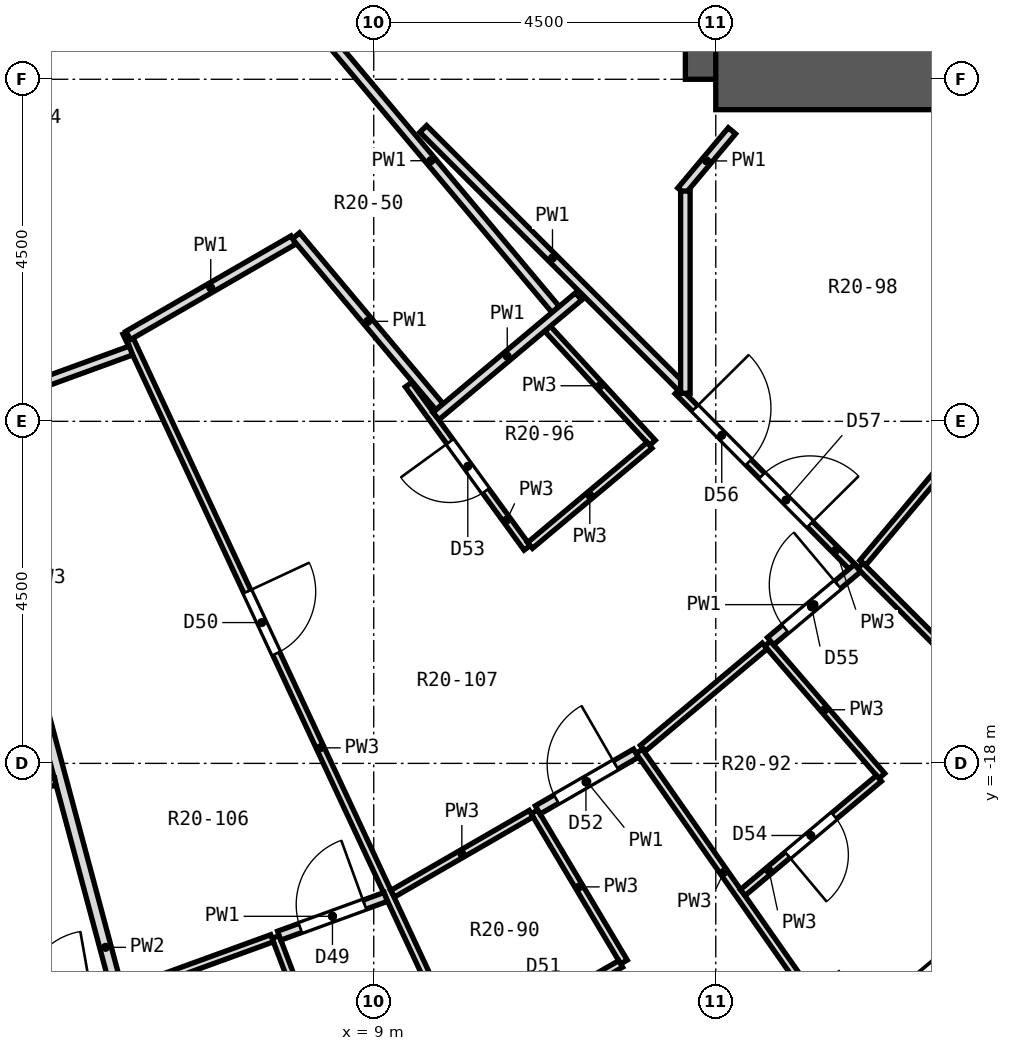
"""IFC4 building model, lengths in metres.
Left out: names, types, materials, properties, quantities, classifications, styles, units other than length and angle.
Written with IfcOpenShell. Run it as: python <this file> out.ifc"""

import sys

from ifc_helpers import new_model, si_unit, direction, frame, frame_2d, origin, place, context, subcontext, project, spatial, rectangle, extrude, element, fill, save


model = new_model("IFC4")
c1 = context("Model", 3, precision=1e-05, world=origin(), true_north=direction((0.0, 1.0)))
c2 = subcontext(c1, "Body", "Model", "MODEL_VIEW")
j1 = project(units=[si_unit("LENGTHUNIT", "METRE"), si_unit("PLANEANGLEUNIT", "RADIAN")], contexts=[c1])
p1 = place(None, origin())
s1 = spatial("IfcSite", under=j1, at=p1, CompositionType="ELEMENT")
p2 = place(p1, origin())
s2 = spatial("IfcBuilding", under=s1, at=p2, CompositionType="ELEMENT")
p3 = place(p2, frame((0.0, 0.0, 121.6)))
s3 = spatial("IfcBuildingStorey", under=s2, at=p3, CompositionType="ELEMENT", Elevation=121.6)
p4 = place(p3, frame((13.5, -9.0, 0.0), z_axis=(0.0, 0.0, 1.0), x_axis=(0.0, 1.0, 0.0)))
e1 = element("IfcWall", 1, at=p4, inside=s3, PredefinedType="SHEAR", context=c2, shape_type="SweptSolid", body=[
    extrude(rectangle(XDim=18.0, YDim=0.8, at=frame_2d((9.0, 0.0))), origin(), (0.0, 0.0, 1.0), 3.3),
])
p5 = place(p4, frame((15.4, 0.0, 0.0)))
e2 = element("IfcOpeningElement", 2, at=p5, cuts=e1, PredefinedType="OPENING", context=c2, shape_type="SweptSolid", body=[
    extrude(rectangle(XDim=1.2, YDim=2.1, at=frame_2d((0.6, 1.05))), frame((0.0, 0.412, 0.0), z_axis=(0.0, -1.0, 0.0), x_axis=(1.0, 0.0, 0.0)), (0.0, 0.0, 1.0), 0.824),
])
p6 = place(p4, frame((1.4, 0.0, 0.0)))
e3 = element("IfcOpeningElement", 3, at=p6, cuts=e1, PredefinedType="OPENING", context=c2, shape_type="SweptSolid", body=[
    extrude(rectangle(XDim=1.2, YDim=2.1, at=frame_2d((0.6, 1.05))), frame((0.0, 0.412, 0.0), z_axis=(0.0, -1.0, 0.0), x_axis=(1.0, 0.0, 0.0)), (0.0, 0.0, 1.0), 0.824),
])
p7 = place(p4, frame((7.5, 0.0, 0.0)))
e4 = element("IfcOpeningElement", 4, at=p7, cuts=e1, PredefinedType="OPENING", context=c2, shape_type="SweptSolid", body=[
    extrude(rectangle(XDim=3.0, YDim=2.4, at=frame_2d((1.5, 1.2))), frame((0.0, 0.412, 0.0), z_axis=(0.0, -1.0, 0.0), x_axis=(1.0, 0.0, 0.0)), (0.0, 0.0, 1.0), 0.824),
])
p8 = place(p3, frame((13.5, -9.0, 0.0), z_axis=(0.0, 0.0, 1.0), x_axis=(1.0, 0.0, 0.0)))
e5 = element("IfcWall", 5, at=p8, inside=s3, PredefinedType="SHEAR", context=c2, shape_type="SweptSolid", body=[
    extrude(rectangle(XDim=10.4, YDim=0.8, at=frame_2d((5.2, 0.0))), origin(), (0.0, 0.0, 1.0), 3.3),
])
p9 = place(p3, frame((15.699, -21.547, 0.0), z_axis=(0.0, 0.0, 1.0), x_axis=(0.766055462616, 0.642774476932, 0.0)))
e6 = element("IfcWall", 6, at=p9, inside=s3, PredefinedType="SOLIDWALL", context=c2, shape_type="SweptSolid", body=[
    extrude(rectangle(XDim=3.648, YDim=0.6, at=frame_2d((1.824, 0.0))), origin(), (0.0, 0.0, 1.0), 2.8),
])
p10 = place(p9, frame((0.674, 0.0, 0.9)))
e7 = element("IfcOpeningElement", 7, at=p10, cuts=e6, PredefinedType="OPENING", context=c2, shape_type="SweptSolid", body=[
    extrude(rectangle(XDim=2.3, YDim=1.8, at=frame_2d((1.15, 0.9))), frame((0.0, 0.312, 0.0), z_axis=(0.0, -1.0, 0.0), x_axis=(1.0, 0.0, 0.0)), (0.0, 0.0, 1.0), 0.624),
])
p11 = place(p3, frame((4.3, -16.05, 0.0), z_axis=(0.0, 0.0, 1.0), x_axis=(0.25880441681, -0.965929745809, 0.0)))
e8 = element("IfcWall", 8, at=p11, inside=s3, PredefinedType="PARTITIONING", context=c2, shape_type="SweptSolid", body=[
    extrude(rectangle(XDim=9.049, YDim=0.15, at=frame_2d((4.524, 0.0))), origin(), (0.0, 0.0, 1.0), 2.8),
])
p12 = place(p3, frame((7.709, -20.284, 0.0), z_axis=(0.0, 0.0, 1.0), x_axis=(0.355156544563, -0.934806840397, 0.0)))
e9 = element("IfcWall", 9, at=p12, inside=s3, PredefinedType="PARTITIONING", context=c2, shape_type="SweptSolid", body=[
    extrude(rectangle(XDim=2.3, YDim=0.1, at=frame_2d((1.15, 0.0))), origin(), (0.0, 0.0, 1.0), 2.8),
])
p13 = place(p3, frame((5.746, -12.331, 0.0), z_axis=(0.0, 0.0, 1.0), x_axis=(0.422888789848, -0.906181588547, 0.0)))
e10 = element("IfcWall", 10, at=p13, inside=s3, PredefinedType="PARTITIONING", context=c2, shape_type="SweptSolid", body=[
    extrude(rectangle(XDim=12.061, YDim=0.1, at=frame_2d((6.03, 0.0))), origin(), (0.0, 0.0, 1.0), 2.8),
])
p14 = place(p13, frame((3.761, 0.0, 0.0)))
e11 = element("IfcOpeningElement", 11, at=p14, cuts=e10, PredefinedType="OPENING", context=c2, shape_type="SweptSolid", body=[
    extrude(rectangle(XDim=0.9, YDim=2.1, at=frame_2d((0.45, 1.05))), frame((0.0, 0.062, 0.0), z_axis=(0.0, -1.0, 0.0), x_axis=(1.0, 0.0, 0.0)), (0.0, 0.0, 1.0), 0.124),
])
p15 = place(p3, frame((11.114, -18.637, 0.0), z_axis=(0.0, 0.0, 1.0), x_axis=(0.512043462342, -0.858959540766, 0.0)))
e12 = element("IfcWall", 12, at=p15, inside=s3, PredefinedType="PARTITIONING", context=c2, shape_type="SweptSolid", body=[
    extrude(rectangle(XDim=2.301, YDim=0.1, at=frame_2d((1.15, 0.0))), origin(), (0.0, 0.0, 1.0), 2.8),
])
p16 = place(p3, frame((12.493, -17.841, 0.0), z_axis=(0.0, 0.0, 1.0), x_axis=(0.573453908861, -0.819237825306, 0.0)))
e13 = element("IfcWall", 13, at=p16, inside=s3, PredefinedType="PARTITIONING", context=c2, shape_type="SweptSolid", body=[
    extrude(rectangle(XDim=3.885, YDim=0.1, at=frame_2d((1.942, 0.0))), origin(), (0.0, 0.0, 1.0), 2.8),
])
p17 = place(p3, frame((9.457, -13.018, 0.0), z_axis=(0.0, 0.0, 1.0), x_axis=(0.588073257703, -0.808807667851, 0.0)))
e14 = element("IfcWall", 14, at=p17, inside=s3, PredefinedType="PARTITIONING", context=c2, shape_type="SweptSolid", body=[
    extrude(rectangle(XDim=2.655, YDim=0.1, at=frame_2d((1.327, 0.0))), origin(), (0.0, 0.0, 1.0), 2.8),
])
p18 = place(p17, frame((0.927, 0.0, 0.0)))
e15 = element("IfcOpeningElement", 15, at=p18, cuts=e14, PredefinedType="OPENING", context=c2, shape_type="SweptSolid", body=[
    extrude(rectangle(XDim=0.8, YDim=2.1, at=frame_2d((0.4, 1.05))), frame((0.0, 0.062, 0.0), z_axis=(0.0, -1.0, 0.0), x_axis=(1.0, 0.0, 0.0)), (0.0, 0.0, 1.0), 0.124),
])
p19 = place(p3, frame((7.977, -11.059, 0.0), z_axis=(0.0, 0.0, 1.0), x_axis=(0.642755449711, -0.766071427393, 0.0)))
e16 = element("IfcWall", 16, at=p19, inside=s3, PredefinedType="PARTITIONING", context=c2, shape_type="SweptSolid", body=[
    extrude(rectangle(XDim=2.938, YDim=0.125, at=frame_2d((1.469, 0.0))), origin(), (0.0, 0.0, 1.0), 2.8),
])
p20 = place(p3, frame((8.109, -8.115, 0.0), z_axis=(0.0, 0.0, 1.0), x_axis=(0.642822182591, -0.766015431678, 0.0)))
e17 = element("IfcWall", 17, at=p20, inside=s3, PredefinedType="PARTITIONING", context=c2, shape_type="SweptSolid", body=[
    extrude(rectangle(XDim=5.109, YDim=0.125, at=frame_2d((2.554, 0.0))), origin(), (0.0, 0.0, 1.0), 2.8),
])
p21 = place(p3, frame((14.182, -16.424, 0.0), z_axis=(0.0, 0.0, 1.0), x_axis=(0.653523142882, -0.756906534334, 0.0)))
e18 = element("IfcWall", 18, at=p21, inside=s3, PredefinedType="PARTITIONING", context=c2, shape_type="SweptSolid", body=[
    extrude(rectangle(XDim=2.3, YDim=0.1, at=frame_2d((1.15, 0.0))), origin(), (0.0, 0.0, 1.0), 2.8),
])
p22 = place(p3, frame((11.286, -12.281, 0.0), z_axis=(0.0, 0.0, 1.0), x_axis=(0.676742772151, -0.736219546291, 0.0)))
e19 = element("IfcWall", 19, at=p22, inside=s3, PredefinedType="PARTITIONING", context=c2, shape_type="SweptSolid", body=[
    extrude(rectangle(XDim=2.04, YDim=0.1, at=frame_2d((1.02, 0.0))), origin(), (0.0, 0.0, 1.0), 2.8),
])
p23 = place(p3, frame((13.0, -13.102, 0.0), z_axis=(0.0, 0.0, 1.0), x_axis=(0.704550545607, -0.70965380904, 0.0)))
e20 = element("IfcWall", 20, at=p23, inside=s3, PredefinedType="PARTITIONING", context=c2, shape_type="SweptSolid", body=[
    extrude(rectangle(XDim=3.253, YDim=0.1, at=frame_2d((1.626, 0.0))), origin(), (0.0, 0.0, 1.0), 2.8),
])
p24 = place(p23, frame((0.32, 0.0, 0.0)))
e21 = element("IfcOpeningElement", 21, at=p24, cuts=e20, PredefinedType="OPENING", context=c2, shape_type="SweptSolid", body=[
    extrude(rectangle(XDim=1.0, YDim=2.1, at=frame_2d((0.5, 1.05))), frame((0.0, 0.062, 0.0), z_axis=(0.0, -1.0, 0.0), x_axis=(1.0, 0.0, 0.0)), (0.0, 0.0, 1.0), 0.124),
])
p25 = place(p23, frame((1.57, 0.0, 0.0)))
e22 = element("IfcOpeningElement", 22, at=p25, cuts=e20, PredefinedType="OPENING", context=c2, shape_type="SweptSolid", body=[
    extrude(rectangle(XDim=0.9, YDim=2.1, at=frame_2d((0.45, 1.05))), frame((0.0, 0.062, 0.0), z_axis=(0.0, -1.0, 0.0), x_axis=(1.0, 0.0, 0.0)), (0.0, 0.0, 1.0), 0.124),
])
p26 = place(p3, frame((9.651, -9.653, 0.0), z_axis=(0.0, 0.0, 1.0), x_axis=(0.707386044222, -0.706827407816, 0.0)))
e23 = element("IfcWall", 23, at=p26, inside=s3, PredefinedType="PARTITIONING", context=c2, shape_type="SweptSolid", body=[
    extrude(rectangle(XDim=4.807, YDim=0.125, at=frame_2d((2.404, 0.0))), origin(), (0.0, 0.0, 1.0), 2.8),
])
p27 = place(p3, frame((15.401, -15.401, 0.0), z_axis=(0.0, 0.0, 1.0), x_axis=(0.707106781187, -0.707106781187, 0.0)))
e24 = element("IfcWall", 24, at=p27, inside=s3, PredefinedType="PARTITIONING", context=c2, shape_type="SweptSolid", body=[
    extrude(rectangle(XDim=3.885, YDim=0.1, at=frame_2d((1.942, 0.0))), origin(), (0.0, 0.0, 1.0), 2.8),
])
p28 = place(p3, frame((1.694, -18.79, 0.0), z_axis=(0.0, 0.0, 1.0), x_axis=(0.984811512808, 0.173626853457, 0.0)))
e25 = element("IfcWall", 25, at=p28, inside=s3, PredefinedType="PARTITIONING", context=c2, shape_type="SweptSolid", body=[
    extrude(rectangle(XDim=3.164, YDim=0.1, at=frame_2d((1.582, 0.0))), origin(), (0.0, 0.0, 1.0), 2.8),
])
p29 = place(p3, frame((5.708, -21.012, 0.0), z_axis=(0.0, 0.0, 1.0), x_axis=(0.939690572239, 0.342025771609, 0.0)))
e26 = element("IfcWall", 26, at=p29, inside=s3, PredefinedType="PARTITIONING", context=c2, shape_type="SweptSolid", body=[
    extrude(rectangle(XDim=2.08, YDim=0.1, at=frame_2d((1.04, 0.0))), origin(), (0.0, 0.0, 1.0), 2.8),
])
p30 = place(p3, frame((7.756, -20.267, 0.0), z_axis=(0.0, 0.0, 1.0), x_axis=(0.939793423488, 0.341743063087, 0.0)))
e27 = element("IfcWall", 27, at=p30, inside=s3, PredefinedType="PARTITIONING", context=c2, shape_type="SweptSolid", body=[
    extrude(rectangle(XDim=1.492, YDim=0.125, at=frame_2d((0.746, 0.0))), origin(), (0.0, 0.0, 1.0), 2.8),
])
p31 = place(p30, frame((0.296, 0.0, 0.0)))
e28 = element("IfcOpeningElement", 28, at=p31, cuts=e27, PredefinedType="OPENING", context=c2, shape_type="SweptSolid", body=[
    extrude(rectangle(XDim=0.9, YDim=2.1, at=frame_2d((0.45, 1.05))), frame((0.0, 0.074, 0.0), z_axis=(0.0, -1.0, 0.0), x_axis=(1.0, 0.0, 0.0)), (0.0, 0.0, 1.0), 0.149),
])
p32 = place(p3, frame((3.644, -13.357, 0.0), z_axis=(0.0, 0.0, 1.0), x_axis=(0.939554653217, 0.342398968484, 0.0)))
e29 = element("IfcWall", 29, at=p32, inside=s3, PredefinedType="PARTITIONING", context=c2, shape_type="SweptSolid", body=[
    extrude(rectangle(XDim=2.301, YDim=0.125, at=frame_2d((1.15, 0.0))), origin(), (0.0, 0.0, 1.0), 2.8),
])
p33 = place(p3, frame((10.224, -21.807, 0.0), z_axis=(0.0, 0.0, 1.0), x_axis=(0.866076057046, 0.499912255713, 0.0)))
e30 = element("IfcWall", 30, at=p33, inside=s3, PredefinedType="PARTITIONING", context=c2, shape_type="SweptSolid", body=[
    extrude(rectangle(XDim=2.338, YDim=0.1, at=frame_2d((1.169, 0.0))), origin(), (0.0, 0.0, 1.0), 2.8),
])
p34 = place(p33, frame((0.769, 0.0, 0.0)))
e31 = element("IfcOpeningElement", 31, at=p34, cuts=e30, PredefinedType="OPENING", context=c2, shape_type="SweptSolid", body=[
    extrude(rectangle(XDim=0.8, YDim=2.1, at=frame_2d((0.4, 1.05))), frame((0.0, 0.062, 0.0), z_axis=(0.0, -1.0, 0.0), x_axis=(1.0, 0.0, 0.0)), (0.0, 0.0, 1.0), 0.124),
])
p35 = place(p3, frame((9.248, -19.715, 0.0), z_axis=(0.0, 0.0, 1.0), x_axis=(0.865870655861, 0.50026793553, 0.0)))
e32 = element("IfcWall", 32, at=p35, inside=s3, PredefinedType="PARTITIONING", context=c2, shape_type="SweptSolid", body=[
    extrude(rectangle(XDim=2.105, YDim=0.1, at=frame_2d((1.052, 0.0))), origin(), (0.0, 0.0, 1.0), 2.8),
])
p36 = place(p3, frame((11.157, -18.612, 0.0), z_axis=(0.0, 0.0, 1.0), x_axis=(0.866060276884, 0.499939593154, 0.0)))
e33 = element("IfcWall", 33, at=p36, inside=s3, PredefinedType="PARTITIONING", context=c2, shape_type="SweptSolid", body=[
    extrude(rectangle(XDim=1.492, YDim=0.125, at=frame_2d((0.746, 0.0))), origin(), (0.0, 0.0, 1.0), 2.8),
])
p37 = place(p36, frame((0.283, 0.0, 0.0)))
e34 = element("IfcOpeningElement", 34, at=p37, cuts=e33, PredefinedType="OPENING", context=c2, shape_type="SweptSolid", body=[
    extrude(rectangle(XDim=0.9, YDim=2.1, at=frame_2d((0.45, 1.05))), frame((0.0, 0.074, 0.0), z_axis=(0.0, -1.0, 0.0), x_axis=(1.0, 0.0, 0.0)), (0.0, 0.0, 1.0), 0.149),
])
p38 = place(p3, frame((5.769, -12.371, 0.0), z_axis=(0.0, 0.0, 1.0), x_axis=(0.865838856669, 0.500322969973, 0.0)))
e35 = element("IfcWall", 35, at=p38, inside=s3, PredefinedType="PARTITIONING", context=c2, shape_type="SweptSolid", body=[
    extrude(rectangle(XDim=2.51, YDim=0.125, at=frame_2d((1.255, 0.0))), origin(), (0.0, 0.0, 1.0), 2.8),
])
p39 = place(p3, frame((13.855, -19.7, 0.0), z_axis=(0.0, 0.0, 1.0), x_axis=(0.76611194323, 0.642707157608, 0.0)))
e36 = element("IfcWall", 36, at=p39, inside=s3, PredefinedType="PARTITIONING", context=c2, shape_type="SweptSolid", body=[
    extrude(rectangle(XDim=2.338, YDim=0.1, at=frame_2d((1.169, 0.0))), origin(), (0.0, 0.0, 1.0), 2.8),
])
p40 = place(p39, frame((0.769, 0.0, 0.0)))
e37 = element("IfcOpeningElement", 37, at=p40, cuts=e36, PredefinedType="OPENING", context=c2, shape_type="SweptSolid", body=[
    extrude(rectangle(XDim=0.8, YDim=2.1, at=frame_2d((0.4, 1.05))), frame((0.0, 0.062, 0.0), z_axis=(0.0, -1.0, 0.0), x_axis=(1.0, 0.0, 0.0)), (0.0, 0.0, 1.0), 0.124),
])
p41 = place(p3, frame((12.541, -17.801, 0.0), z_axis=(0.0, 0.0, 1.0), x_axis=(0.766132236748, 0.6426829668, 0.0)))
e38 = element("IfcWall", 38, at=p41, inside=s3, PredefinedType="PARTITIONING", context=c2, shape_type="SweptSolid", body=[
    extrude(rectangle(XDim=2.092, YDim=0.1, at=frame_2d((1.046, 0.0))), origin(), (0.0, 0.0, 1.0), 2.8),
])
p42 = place(p3, frame((14.22, -16.392, 0.0), z_axis=(0.0, 0.0, 1.0), x_axis=(0.765994359698, 0.642847292062, 0.0)))
e39 = element("IfcWall", 39, at=p42, inside=s3, PredefinedType="PARTITIONING", context=c2, shape_type="SweptSolid", body=[
    extrude(rectangle(XDim=1.495, YDim=0.125, at=frame_2d((0.748, 0.0))), origin(), (0.0, 0.0, 1.0), 2.8),
])
p43 = place(p42, frame((0.253, 0.0, 0.0)))
e40 = element("IfcOpeningElement", 40, at=p43, cuts=e39, PredefinedType="OPENING", context=c2, shape_type="SweptSolid", body=[
    extrude(rectangle(XDim=0.9, YDim=2.1, at=frame_2d((0.45, 1.05))), frame((0.0, 0.074, 0.0), z_axis=(0.0, -1.0, 0.0), x_axis=(1.0, 0.0, 0.0)), (0.0, 0.0, 1.0), 0.149),
])
p44 = place(p3, frame((11.056, -15.133, 0.0), z_axis=(0.0, 0.0, 1.0), x_axis=(0.766442887367, 0.642312463217, 0.0)))
e41 = element("IfcWall", 41, at=p44, inside=s3, PredefinedType="PARTITIONING", context=c2, shape_type="SweptSolid", body=[
    extrude(rectangle(XDim=2.051, YDim=0.1, at=frame_2d((1.026, 0.0))), origin(), (0.0, 0.0, 1.0), 2.8),
])
p45 = place(p3, frame((9.819, -13.43, 0.0), z_axis=(0.0, 0.0, 1.0), x_axis=(0.76617412247, 0.642633032186, 0.0)))
e42 = element("IfcWall", 42, at=p45, inside=s3, PredefinedType="PARTITIONING", context=c2, shape_type="SweptSolid", body=[
    extrude(rectangle(XDim=2.448, YDim=0.125, at=frame_2d((1.224, 0.0))), origin(), (0.0, 0.0, 1.0), 2.8),
])
p46 = place(p3, frame((15.434, -15.362, 0.0), z_axis=(0.0, 0.0, 1.0), x_axis=(0.642658417854, 0.766152829376, 0.0)))
e43 = element("IfcWall", 43, at=p46, inside=s3, PredefinedType="PARTITIONING", context=c2, shape_type="SweptSolid", body=[
    extrude(rectangle(XDim=2.104, YDim=0.1, at=frame_2d((1.052, 0.0))), origin(), (0.0, 0.0, 1.0), 2.8),
])
p47 = place(p3, frame((13.048, -10.47, 0.0), z_axis=(0.0, 0.0, 1.0), x_axis=(0.642549676363, 0.766244029932, 0.0)))
e44 = element("IfcWall", 44, at=p47, inside=s3, PredefinedType="PARTITIONING", context=c2, shape_type="SweptSolid", body=[
    extrude(rectangle(XDim=1.034, YDim=0.125, at=frame_2d((0.517, 0.0))), origin(), (0.0, 0.0, 1.0), 2.8),
])
p48 = place(p3, frame((13.1, -13.131, 0.0), z_axis=(0.0, 0.0, 1.0), x_axis=(0.0, 1.0, 0.0)))
e45 = element("IfcWall", 45, at=p48, inside=s3, PredefinedType="PARTITIONING", context=c2, shape_type="SweptSolid", body=[
    extrude(rectangle(XDim=2.66, YDim=0.125, at=frame_2d((1.33, 0.0))), origin(), (0.0, 0.0, 1.0), 2.8),
])
p49 = place(p10, origin())
e46 = element("IfcWindow", 46, at=p49, inside=s3, PartitioningType="SINGLE_PANEL", PredefinedType="WINDOW", context=c2, shape_type="SweptSolid", body=[
    extrude(rectangle(XDim=2.3, YDim=1.8, at=frame_2d((1.15, 0.9))), frame((0.0, 0.18, 0.0), z_axis=(0.0, -1.0, 0.0), x_axis=(1.0, 0.0, 0.0)), (0.0, 0.0, 1.0), 0.06),
])
fill(e7, e46)
p50 = place(p31, origin())
e47 = element("IfcDoor", 47, at=p50, inside=s3, OperationType="SINGLE_SWING_RIGHT", PredefinedType="DOOR", context=c2, shape_type="SweptSolid", body=[
    extrude(rectangle(XDim=0.9, YDim=2.1, at=frame_2d((0.45, 1.05))), frame((0.0, 0.025, 0.0), z_axis=(0.0, -1.0, 0.0), x_axis=(1.0, 0.0, 0.0)), (0.0, 0.0, 1.0), 0.05),
])
fill(e28, e47)
p51 = place(p14, origin())
e48 = element("IfcDoor", 48, at=p51, inside=s3, OperationType="SINGLE_SWING_LEFT", PredefinedType="DOOR", context=c2, shape_type="SweptSolid", body=[
    extrude(rectangle(XDim=0.9, YDim=2.1, at=frame_2d((0.45, 1.05))), frame((0.0, 0.025, 0.0), z_axis=(0.0, -1.0, 0.0), x_axis=(1.0, 0.0, 0.0)), (0.0, 0.0, 1.0), 0.05),
])
fill(e11, e48)
p52 = place(p37, origin())
e49 = element("IfcDoor", 49, at=p52, inside=s3, OperationType="SINGLE_SWING_RIGHT", PredefinedType="DOOR", context=c2, shape_type="SweptSolid", body=[
    extrude(rectangle(XDim=0.9, YDim=2.1, at=frame_2d((0.45, 1.05))), frame((0.0, 0.025, 0.0), z_axis=(0.0, -1.0, 0.0), x_axis=(1.0, 0.0, 0.0)), (0.0, 0.0, 1.0), 0.05),
])
fill(e34, e49)
p53 = place(p18, frame((0.8, 0.0, 0.0), z_axis=(0.0, 0.0, 1.0), x_axis=(-1.0, 0.0, 0.0)))
e50 = element("IfcDoor", 50, at=p53, inside=s3, OperationType="SINGLE_SWING_RIGHT", PredefinedType="DOOR", context=c2, shape_type="SweptSolid", body=[
    extrude(rectangle(XDim=0.8, YDim=2.1, at=frame_2d((0.4, 1.05))), frame((0.0, 0.025, 0.0), z_axis=(0.0, -1.0, 0.0), x_axis=(1.0, 0.0, 0.0)), (0.0, 0.0, 1.0), 0.05),
])
fill(e15, e50)
p54 = place(p40, frame((0.8, 0.0, 0.0), z_axis=(0.0, 0.0, 1.0), x_axis=(-1.0, 0.0, 0.0)))
e51 = element("IfcDoor", 51, at=p54, inside=s3, OperationType="SINGLE_SWING_RIGHT", PredefinedType="DOOR", context=c2, shape_type="SweptSolid", body=[
    extrude(rectangle(XDim=0.8, YDim=2.1, at=frame_2d((0.4, 1.05))), frame((0.0, 0.025, 0.0), z_axis=(0.0, -1.0, 0.0), x_axis=(1.0, 0.0, 0.0)), (0.0, 0.0, 1.0), 0.05),
])
fill(e37, e51)
p55 = place(p43, origin())
e52 = element("IfcDoor", 52, at=p55, inside=s3, OperationType="SINGLE_SWING_RIGHT", PredefinedType="DOOR", context=c2, shape_type="SweptSolid", body=[
    extrude(rectangle(XDim=0.9, YDim=2.1, at=frame_2d((0.45, 1.05))), frame((0.0, 0.025, 0.0), z_axis=(0.0, -1.0, 0.0), x_axis=(1.0, 0.0, 0.0)), (0.0, 0.0, 1.0), 0.05),
])
fill(e40, e52)
p56 = place(p24, origin())
e53 = element("IfcDoor", 53, at=p56, inside=s3, OperationType="SINGLE_SWING_LEFT", PredefinedType="DOOR", context=c2, shape_type="SweptSolid", body=[
    extrude(rectangle(XDim=1.0, YDim=2.1, at=frame_2d((0.5, 1.05))), frame((0.0, 0.025, 0.0), z_axis=(0.0, -1.0, 0.0), x_axis=(1.0, 0.0, 0.0)), (0.0, 0.0, 1.0), 0.05),
])
fill(e21, e53)
p57 = place(p25, origin())
e54 = element("IfcDoor", 54, at=p57, inside=s3, OperationType="SINGLE_SWING_RIGHT", PredefinedType="DOOR", context=c2, shape_type="SweptSolid", body=[
    extrude(rectangle(XDim=0.9, YDim=2.1, at=frame_2d((0.45, 1.05))), frame((0.0, 0.025, 0.0), z_axis=(0.0, -1.0, 0.0), x_axis=(1.0, 0.0, 0.0)), (0.0, 0.0, 1.0), 0.05),
])
fill(e22, e54)
save(model, sys.argv[1])
